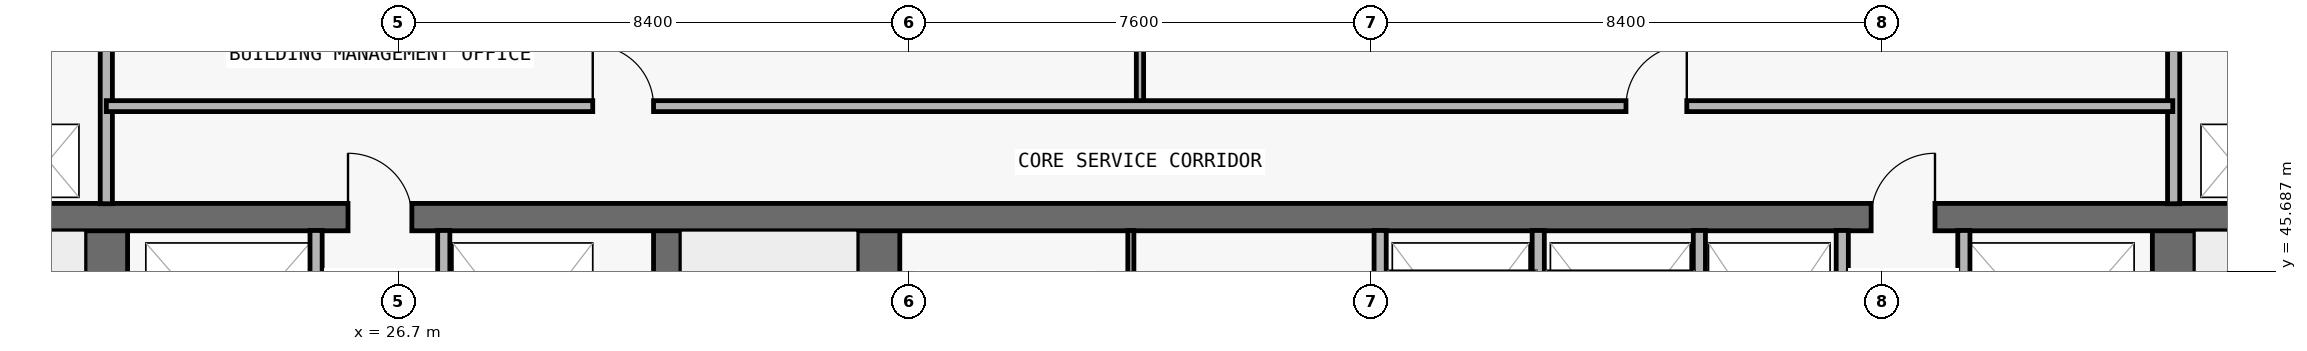
"""IFC4 building model, lengths in metres.
Left out: names, types, materials, properties, quantities, classifications, styles, units other than length and angle.
Written with IfcOpenShell. Run it as: python <this file> out.ifc"""

import sys

from ifc_helpers import new_model, si_unit, direction, frame, frame_2d, origin, place, context, subcontext, project, spatial, rectangle, extrude, element, fill, save


model = new_model("IFC4")
c1 = context("Model", 3, precision=1e-05, world=origin(), true_north=direction((0.0, 1.0)))
c2 = subcontext(c1, "Body", "Model", "MODEL_VIEW")
j1 = project(units=[si_unit("LENGTHUNIT", "METRE"), si_unit("PLANEANGLEUNIT", "RADIAN")], contexts=[c1])
p1 = place(None, origin())
s1 = spatial("IfcSite", under=j1, at=p1, CompositionType="ELEMENT")
p2 = place(p1, origin())
s2 = spatial("IfcBuilding", under=s1, at=p2, CompositionType="ELEMENT")
p3 = place(p2, frame((0.0, 0.0, 132.3)))
s3 = spatial("IfcBuildingStorey", under=s2, at=p3, CompositionType="ELEMENT", Elevation=132.3)
p4 = place(p3, frame((21.9, 36.95, 0.0), z_axis=(0.0, 0.0, 1.0), x_axis=(0.0, 1.0, 0.0)))
e1 = element("IfcWall", 1, at=p4, inside=s3, PredefinedType="SHEAR", context=c2, shape_type="SweptSolid", body=[
    extrude(rectangle(XDim=9.625, YDim=0.7, at=frame_2d((4.812, 0.0))), origin(), (0.0, 0.0, 1.0), 3.05),
])
p5 = place(p4, frame((0.6, 0.0, 0.0)))
e2 = element("IfcOpeningElement", 2, at=p5, cuts=e1, PredefinedType="OPENING", context=c2, shape_type="SweptSolid", body=[
    extrude(rectangle(XDim=1.1, YDim=2.15, at=frame_2d((0.55, 1.075))), frame((0.0, 0.36, 0.0), z_axis=(0.0, -1.0, 0.0), x_axis=(1.0, 0.0, 0.0)), (0.0, 0.0, 1.0), 0.72),
])
p6 = place(p3, frame((55.9, 36.95, 0.0), z_axis=(0.0, 0.0, 1.0), x_axis=(0.0, 1.0, 0.0)))
e3 = element("IfcWall", 3, at=p6, inside=s3, PredefinedType="SHEAR", context=c2, shape_type="SweptSolid", body=[
    extrude(rectangle(XDim=9.625, YDim=0.7, at=frame_2d((4.812, 0.0))), origin(), (0.0, 0.0, 1.0), 3.05),
])
p7 = place(p6, frame((0.6, 0.0, 0.0)))
e4 = element("IfcOpeningElement", 4, at=p7, cuts=e3, PredefinedType="OPENING", context=c2, shape_type="SweptSolid", body=[
    extrude(rectangle(XDim=1.1, YDim=2.15, at=frame_2d((0.55, 1.075))), frame((0.0, 0.36, 0.0), z_axis=(0.0, -1.0, 0.0), x_axis=(1.0, 0.0, 0.0)), (0.0, 0.0, 1.0), 0.72),
])
p8 = place(p3, frame((31.125, 36.95, 0.0), z_axis=(0.0, 0.0, 1.0), x_axis=(0.0, 1.0, 0.0)))
e5 = element("IfcWall", 5, at=p8, inside=s3, PredefinedType="SHEAR", context=c2, shape_type="SweptSolid", body=[
    extrude(rectangle(XDim=9.625, YDim=0.45, at=frame_2d((4.812, 0.0))), origin(), (0.0, 0.0, 1.0), 3.05),
])
p9 = place(p3, frame((34.6, 36.95, 0.0), z_axis=(0.0, 0.0, 1.0), x_axis=(0.0, 1.0, 0.0)))
e6 = element("IfcWall", 6, at=p9, inside=s3, PredefinedType="SHEAR", context=c2, shape_type="SweptSolid", body=[
    extrude(rectangle(XDim=9.625, YDim=0.7, at=frame_2d((4.812, 0.0))), origin(), (0.0, 0.0, 1.0), 3.05),
])
p10 = place(p3, frame((18.25, 46.575, 0.0), z_axis=(0.0, 0.0, 1.0), x_axis=(1.0, 0.0, 0.0)))
e7 = element("IfcWall", 7, at=p10, inside=s3, PredefinedType="SHEAR", context=c2, shape_type="SweptSolid", body=[
    extrude(rectangle(XDim=41.3, YDim=0.45, at=frame_2d((20.65, 0.0))), origin(), (0.0, 0.0, 1.0), 3.05),
])
p11 = place(p10, frame((7.625, 0.0, 0.0)))
e8 = element("IfcOpeningElement", 8, at=p11, cuts=e7, PredefinedType="OPENING", context=c2, shape_type="SweptSolid", body=[
    extrude(rectangle(XDim=1.05, YDim=2.15, at=frame_2d((0.525, 1.075))), frame((0.0, 0.235, 0.0), z_axis=(0.0, -1.0, 0.0), x_axis=(1.0, 0.0, 0.0)), (0.0, 0.0, 1.0), 0.47),
])
p12 = place(p10, frame((32.675, 0.0, 0.0)))
e9 = element("IfcOpeningElement", 9, at=p12, cuts=e7, PredefinedType="OPENING", context=c2, shape_type="SweptSolid", body=[
    extrude(rectangle(XDim=1.05, YDim=2.15, at=frame_2d((0.525, 1.075))), frame((0.0, 0.235, 0.0), z_axis=(0.0, -1.0, 0.0), x_axis=(1.0, 0.0, 0.0)), (0.0, 0.0, 1.0), 0.47),
])
p13 = place(p3, frame((21.9, 46.795, 0.0), z_axis=(0.0, 0.0, 1.0), x_axis=(0.0, 1.0, 0.0)))
e10 = element("IfcWall", 10, at=p13, inside=s3, PredefinedType="PARTITIONING", context=c2, shape_type="SweptSolid", body=[
    extrude(rectangle(XDim=3.16, YDim=0.2, at=frame_2d((1.58, 0.0))), origin(), (0.0, 0.0, 1.0), 3.05),
])
for number, where, z_axis, x_axis in (
    (11, (25.35, 43.17, 0.0), (0.0, 0.0, 1.0), (0.0, 1.0, 0.0)),
    (12, (27.45, 43.17, 0.0), (0.0, 0.0, 1.0), (0.0, 1.0, 0.0)),
):
    element("IfcWall", number, at=place(p3, frame(where, z_axis=z_axis, x_axis=x_axis)), inside=s3, PredefinedType="PARTITIONING", context=c2, shape_type="SweptSolid", body=[
        extrude(rectangle(XDim=3.185, YDim=0.2, at=frame_2d((1.593, 0.0))), origin(), (0.0, 0.0, 1.0), 3.05),
    ])
p14 = place(p3, frame((38.75, 43.17, 0.0), z_axis=(0.0, 0.0, 1.0), x_axis=(0.0, 1.0, 0.0)))
e13 = element("IfcWall", 13, at=p14, inside=s3, PredefinedType="MOVABLE", context=c2, shape_type="SweptSolid", body=[
    extrude(rectangle(XDim=3.185, YDim=0.1, at=frame_2d((1.593, 0.0))), origin(), (0.0, 0.0, 1.0), 3.05),
])
p15 = place(p3, frame((38.9, 48.4, 0.0), z_axis=(0.0, 0.0, 1.0), x_axis=(0.0, 1.0, 0.0)))
e14 = element("IfcWall", 14, at=p15, inside=s3, PredefinedType="PARTITIONING", context=c2, shape_type="SweptSolid", body=[
    extrude(rectangle(XDim=1.555, YDim=0.12, at=frame_2d((0.778, 0.0))), origin(), (0.0, 0.0, 1.0), 3.05),
])
for number, where, z_axis, x_axis in (
    (15, (42.85, 43.17, 0.0), (0.0, 0.0, 1.0), (0.0, 1.0, 0.0)),
    (16, (45.45, 43.17, 0.0), (0.0, 0.0, 1.0), (0.0, 1.0, 0.0)),
    (17, (48.1, 43.17, 0.0), (0.0, 0.0, 1.0), (0.0, 1.0, 0.0)),
    (18, (50.45, 43.17, 0.0), (0.0, 0.0, 1.0), (0.0, 1.0, 0.0)),
    (19, (52.45, 43.17, 0.0), (0.0, 0.0, 1.0), (0.0, 1.0, 0.0)),
):
    element("IfcWall", number, at=place(p3, frame(where, z_axis=z_axis, x_axis=x_axis)), inside=s3, PredefinedType="PARTITIONING", context=c2, shape_type="SweptSolid", body=[
        extrude(rectangle(XDim=3.185, YDim=0.2, at=frame_2d((1.593, 0.0))), origin(), (0.0, 0.0, 1.0), 3.05),
    ])
p16 = place(p3, frame((55.9, 46.795, 0.0), z_axis=(0.0, 0.0, 1.0), x_axis=(0.0, 1.0, 0.0)))
e20 = element("IfcWall", 20, at=p16, inside=s3, PredefinedType="PARTITIONING", context=c2, shape_type="SweptSolid", body=[
    extrude(rectangle(XDim=3.16, YDim=0.2, at=frame_2d((1.58, 0.0))), origin(), (0.0, 0.0, 1.0), 3.05),
])
p17 = place(p3, frame((21.9, 48.4, 0.0), z_axis=(0.0, 0.0, 1.0), x_axis=(1.0, 0.0, 0.0)))
e21 = element("IfcWall", 21, at=p17, inside=s3, PredefinedType="PARTITIONING", context=c2, shape_type="SweptSolid", body=[
    extrude(rectangle(XDim=33.986, YDim=0.18, at=frame_2d((16.993, 0.0))), origin(), (0.0, 0.0, 1.0), 3.05),
])
p18 = place(p17, frame((8.0, 0.0, 0.0)))
e22 = element("IfcOpeningElement", 22, at=p18, cuts=e21, PredefinedType="OPENING", context=c2, shape_type="SweptSolid", body=[
    extrude(rectangle(XDim=1.0, YDim=2.2, at=frame_2d((0.5, 1.1))), frame((0.0, 0.1, 0.0), z_axis=(0.0, -1.0, 0.0), x_axis=(1.0, 0.0, 0.0)), (0.0, 0.0, 1.0), 0.2),
])
p19 = place(p17, frame((24.993, 0.0, 0.0)))
e23 = element("IfcOpeningElement", 23, at=p19, cuts=e21, PredefinedType="OPENING", context=c2, shape_type="SweptSolid", body=[
    extrude(rectangle(XDim=1.0, YDim=2.2, at=frame_2d((0.5, 1.1))), frame((0.0, 0.1, 0.0), z_axis=(0.0, -1.0, 0.0), x_axis=(1.0, 0.0, 0.0)), (0.0, 0.0, 1.0), 0.2),
])
p20 = place(p11, origin())
e24 = element("IfcDoor", 24, at=p20, inside=s3, OperationType="SINGLE_SWING_LEFT", PredefinedType="DOOR", context=c2, shape_type="SweptSolid", body=[
    extrude(rectangle(XDim=1.05, YDim=2.15, at=frame_2d((0.525, 1.075))), frame((0.0, 0.025, 0.0), z_axis=(0.0, -1.0, 0.0), x_axis=(1.0, 0.0, 0.0)), (0.0, 0.0, 1.0), 0.05),
])
fill(e8, e24)
p21 = place(p12, origin())
e25 = element("IfcDoor", 25, at=p21, inside=s3, OperationType="SINGLE_SWING_RIGHT", PredefinedType="DOOR", context=c2, shape_type="SweptSolid", body=[
    extrude(rectangle(XDim=1.05, YDim=2.15, at=frame_2d((0.525, 1.075))), frame((0.0, 0.025, 0.0), z_axis=(0.0, -1.0, 0.0), x_axis=(1.0, 0.0, 0.0)), (0.0, 0.0, 1.0), 0.05),
])
fill(e9, e25)
p22 = place(p18, origin())
e26 = element("IfcDoor", 26, at=p22, inside=s3, OperationType="SINGLE_SWING_LEFT", PredefinedType="DOOR", context=c2, shape_type="SweptSolid", body=[
    extrude(rectangle(XDim=1.0, YDim=2.2, at=frame_2d((0.5, 1.1))), frame((0.0, 0.025, 0.0), z_axis=(0.0, -1.0, 0.0), x_axis=(1.0, 0.0, 0.0)), (0.0, 0.0, 1.0), 0.05),
])
fill(e22, e26)
p23 = place(p19, origin())
e27 = element("IfcDoor", 27, at=p23, inside=s3, OperationType="SINGLE_SWING_RIGHT", PredefinedType="DOOR", context=c2, shape_type="SweptSolid", body=[
    extrude(rectangle(XDim=1.0, YDim=2.2, at=frame_2d((0.5, 1.1))), frame((0.0, 0.025, 0.0), z_axis=(0.0, -1.0, 0.0), x_axis=(1.0, 0.0, 0.0)), (0.0, 0.0, 1.0), 0.05),
])
fill(e23, e27)
save(model, sys.argv[1])
